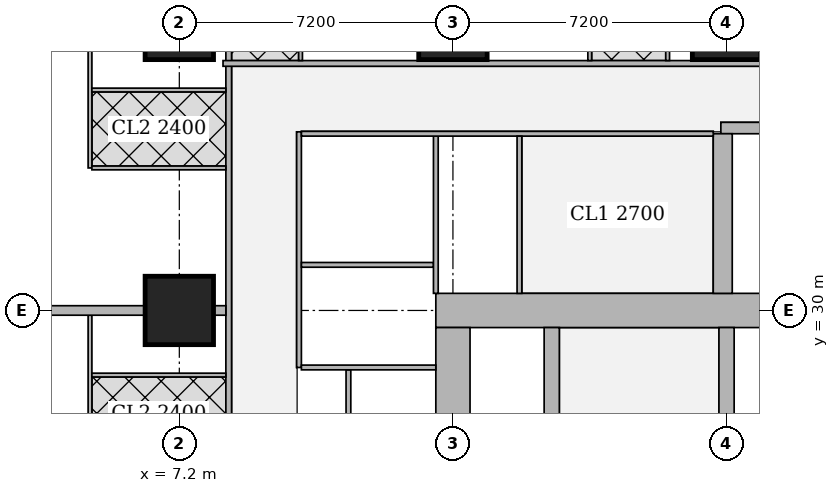
"""IFC4 building model, lengths in metres.
Left out: names, types, materials, properties, quantities, classifications, styles, units other than length and angle.
Written with IfcOpenShell. Run it as: python <this file> out.ifc"""

import sys

from ifc_helpers import new_model, si_unit, direction, frame, frame_2d, origin, origin_2d, place, context, subcontext, project, spatial, rectangle, extrude, element, fill, save


model = new_model("IFC4")
c1 = context("Model", 3, precision=1e-05, world=origin(), true_north=direction((0.0, 1.0)))
c2 = subcontext(c1, "Body", "Model", "MODEL_VIEW")
j1 = project(units=[si_unit("LENGTHUNIT", "METRE"), si_unit("PLANEANGLEUNIT", "RADIAN")], contexts=[c1])
p1 = place(None, origin())
s1 = spatial("IfcSite", under=j1, at=p1, CompositionType="ELEMENT")
p2 = place(p1, origin())
s2 = spatial("IfcBuilding", under=s1, at=p2, CompositionType="ELEMENT")
p3 = place(p2, frame((0.0, 0.0, 42.5)))
s3 = spatial("IfcBuildingStorey", under=s2, at=p3, CompositionType="ELEMENT", Elevation=42.5)
for number, where, z_axis, x_axis in (
    (1, (7.2, 30.0, 0.0), (0.0, 0.0, 1.0), (1.0, 0.0, 0.0)),
    (2, (7.2, 37.5, 0.0), (0.0, 0.0, 1.0), (1.0, 0.0, 0.0)),
    (3, (14.4, 37.5, 0.0), (0.0, 0.0, 1.0), (1.0, 0.0, 0.0)),
    (4, (21.6, 37.5, 0.0), (0.0, 0.0, 1.0), (1.0, 0.0, 0.0)),
):
    element("IfcColumn", number, at=place(p3, frame(where, z_axis=z_axis, x_axis=x_axis)), inside=s3, PredefinedType="COLUMN", context=c2, shape_type="SweptSolid", body=[
        extrude(rectangle(XDim=1.8, YDim=1.8, at=origin_2d()), origin(), (0.0, 0.0, 1.0), 3.75),
    ])
p4 = place(p3, frame((13.95, 30.0, 0.0), z_axis=(0.0, 0.0, 1.0), x_axis=(1.0, 0.0, 0.0)))
e5 = element("IfcWall", 5, at=p4, inside=s3, PredefinedType="SHEAR", context=c2, shape_type="SweptSolid", body=[
    extrude(rectangle(XDim=15.3, YDim=0.9, at=frame_2d((7.65, 0.0))), origin(), (0.0, 0.0, 1.0), 3.75),
])
p5 = place(p4, frame((4.45, 0.0, 0.0)))
e6 = element("IfcOpeningElement", 6, at=p5, cuts=e5, PredefinedType="OPENING", context=c2, shape_type="SweptSolid", body=[
    extrude(rectangle(XDim=1.8, YDim=2.1, at=frame_2d((0.9, 1.05))), frame((0.0, 0.46, 0.0), z_axis=(0.0, -1.0, 0.0), x_axis=(1.0, 0.0, 0.0)), (0.0, 0.0, 1.0), 0.92),
])
p6 = place(p4, frame((10.7, 0.0, 0.0)))
e7 = element("IfcOpeningElement", 7, at=p6, cuts=e5, PredefinedType="OPENING", context=c2, shape_type="SweptSolid", body=[
    extrude(rectangle(XDim=1.1, YDim=2.1, at=frame_2d((0.55, 1.05))), frame((0.0, 0.46, 0.0), z_axis=(0.0, -1.0, 0.0), x_axis=(1.0, 0.0, 0.0)), (0.0, 0.0, 1.0), 0.92),
])
p7 = place(p3, frame((14.4, 15.45, 0.0), z_axis=(0.0, 0.0, 1.0), x_axis=(0.0, 1.0, 0.0)))
e8 = element("IfcWall", 8, at=p7, inside=s3, PredefinedType="SHEAR", context=c2, shape_type="SweptSolid", body=[
    extrude(rectangle(XDim=14.1, YDim=0.9, at=frame_2d((7.05, 0.0))), origin(), (0.0, 0.0, 1.0), 3.75),
])
p8 = place(p3, frame((17.0, 15.45, 0.0), z_axis=(0.0, 0.0, 1.0), x_axis=(0.0, 1.0, 0.0)))
e9 = element("IfcWall", 9, at=p8, inside=s3, PredefinedType="SHEAR", context=c2, shape_type="SweptSolid", body=[
    extrude(rectangle(XDim=14.1, YDim=0.4, at=frame_2d((7.05, 0.0))), origin(), (0.0, 0.0, 1.0), 3.75),
])
p9 = place(p8, frame((0.875, 0.0, 0.0)))
e10 = element("IfcOpeningElement", 10, at=p9, cuts=e9, PredefinedType="OPENING", context=c2, shape_type="SweptSolid", body=[
    extrude(rectangle(XDim=1.1, YDim=2.1, at=frame_2d((0.55, 1.05))), frame((0.0, 0.21, 0.0), z_axis=(0.0, -1.0, 0.0), x_axis=(1.0, 0.0, 0.0)), (0.0, 0.0, 1.0), 0.42),
])
p10 = place(p8, frame((4.625, 0.0, 0.0)))
e11 = element("IfcOpeningElement", 11, at=p10, cuts=e9, PredefinedType="OPENING", context=c2, shape_type="SweptSolid", body=[
    extrude(rectangle(XDim=1.1, YDim=2.1, at=frame_2d((0.55, 1.05))), frame((0.0, 0.21, 0.0), z_axis=(0.0, -1.0, 0.0), x_axis=(1.0, 0.0, 0.0)), (0.0, 0.0, 1.0), 0.42),
])
p11 = place(p8, frame((8.375, 0.0, 0.0)))
e12 = element("IfcOpeningElement", 12, at=p11, cuts=e9, PredefinedType="OPENING", context=c2, shape_type="SweptSolid", body=[
    extrude(rectangle(XDim=1.1, YDim=2.1, at=frame_2d((0.55, 1.05))), frame((0.0, 0.21, 0.0), z_axis=(0.0, -1.0, 0.0), x_axis=(1.0, 0.0, 0.0)), (0.0, 0.0, 1.0), 0.42),
])
p12 = place(p8, frame((12.125, 0.0, 0.0)))
e13 = element("IfcOpeningElement", 13, at=p12, cuts=e9, PredefinedType="OPENING", context=c2, shape_type="SweptSolid", body=[
    extrude(rectangle(XDim=1.1, YDim=2.1, at=frame_2d((0.55, 1.05))), frame((0.0, 0.21, 0.0), z_axis=(0.0, -1.0, 0.0), x_axis=(1.0, 0.0, 0.0)), (0.0, 0.0, 1.0), 0.42),
])
p13 = place(p3, frame((21.6, 15.45, 0.0), z_axis=(0.0, 0.0, 1.0), x_axis=(0.0, 1.0, 0.0)))
e14 = element("IfcWall", 14, at=p13, inside=s3, PredefinedType="SHEAR", context=c2, shape_type="SweptSolid", body=[
    extrude(rectangle(XDim=14.1, YDim=0.4, at=frame_2d((7.05, 0.0))), origin(), (0.0, 0.0, 1.0), 3.75),
])
p14 = place(p3, frame((21.45, 34.8, 0.0), z_axis=(0.0, 0.0, 1.0), x_axis=(1.0, 0.0, 0.0)))
e15 = element("IfcWall", 15, at=p14, inside=s3, PredefinedType="SHEAR", context=c2, shape_type="SweptSolid", body=[
    extrude(rectangle(XDim=7.5, YDim=0.3, at=frame_2d((3.75, 0.0))), origin(), (0.0, 0.0, 1.0), 3.75),
])
p15 = place(p14, frame((0.5, 0.0, 0.0)))
e16 = element("IfcOpeningElement", 16, at=p15, cuts=e15, PredefinedType="OPENING", context=c2, shape_type="SweptSolid", body=[
    extrude(rectangle(XDim=1.1, YDim=2.1, at=frame_2d((0.55, 1.05))), frame((0.0, 0.16, 0.0), z_axis=(0.0, -1.0, 0.0), x_axis=(1.0, 0.0, 0.0)), (0.0, 0.0, 1.0), 0.32),
])
p16 = place(p3, frame((21.5, 30.45, 0.0), z_axis=(0.0, 0.0, 1.0), x_axis=(0.0, 1.0, 0.0)))
e17 = element("IfcWall", 17, at=p16, inside=s3, PredefinedType="SHEAR", context=c2, shape_type="SweptSolid", body=[
    extrude(rectangle(XDim=4.2, YDim=0.5, at=frame_2d((2.1, 0.0))), origin(), (0.0, 0.0, 1.0), 3.75),
])
p17 = place(p3, frame((8.5, 2.426, 0.0), z_axis=(0.0, 0.0, 1.0), x_axis=(0.0, 1.0, 0.0)))
e18 = element("IfcWall", 18, at=p17, inside=s3, PredefinedType="SOLIDWALL", context=c2, shape_type="SweptSolid", body=[
    extrude(rectangle(XDim=40.173, YDim=0.15, at=frame_2d((20.086, 0.0))), origin(), (0.0, 0.0, 1.0), 3.5),
])
p18 = place(p17, frame((9.986, 0.0, 0.0)))
e19 = element("IfcOpeningElement", 19, at=p18, cuts=e18, PredefinedType="OPENING", context=c2, shape_type="SweptSolid", body=[
    extrude(rectangle(XDim=1.0, YDim=2.1, at=frame_2d((0.5, 1.05))), frame((0.0, 0.085, 0.0), z_axis=(0.0, -1.0, 0.0), x_axis=(1.0, 0.0, 0.0)), (0.0, 0.0, 1.0), 0.17),
])
p19 = place(p17, frame((14.161, 0.0, 0.0)))
e20 = element("IfcOpeningElement", 20, at=p19, cuts=e18, PredefinedType="OPENING", context=c2, shape_type="SweptSolid", body=[
    extrude(rectangle(XDim=1.0, YDim=2.1, at=frame_2d((0.5, 1.05))), frame((0.0, 0.085, 0.0), z_axis=(0.0, -1.0, 0.0), x_axis=(1.0, 0.0, 0.0)), (0.0, 0.0, 1.0), 0.17),
])
p20 = place(p17, frame((21.662, 0.0, 0.0)))
e21 = element("IfcOpeningElement", 21, at=p20, cuts=e18, PredefinedType="OPENING", context=c2, shape_type="SweptSolid", body=[
    extrude(rectangle(XDim=1.0, YDim=2.1, at=frame_2d((0.5, 1.05))), frame((0.0, 0.085, 0.0), z_axis=(0.0, -1.0, 0.0), x_axis=(1.0, 0.0, 0.0)), (0.0, 0.0, 1.0), 0.17),
])
p21 = place(p17, frame((29.161, 0.0, 0.0)))
e22 = element("IfcOpeningElement", 22, at=p21, cuts=e18, PredefinedType="OPENING", context=c2, shape_type="SweptSolid", body=[
    extrude(rectangle(XDim=1.0, YDim=2.1, at=frame_2d((0.5, 1.05))), frame((0.0, 0.085, 0.0), z_axis=(0.0, -1.0, 0.0), x_axis=(1.0, 0.0, 0.0)), (0.0, 0.0, 1.0), 0.17),
])
p22 = place(p3, frame((8.35, 36.5, 0.0), z_axis=(0.0, 0.0, 1.0), x_axis=(1.0, 0.0, 0.0)))
e23 = element("IfcWall", 23, at=p22, inside=s3, PredefinedType="SOLIDWALL", context=c2, shape_type="SweptSolid", body=[
    extrude(rectangle(XDim=26.415, YDim=0.15, at=frame_2d((13.208, 0.0))), origin(), (0.0, 0.0, 1.0), 3.5),
])
p23 = place(p22, frame((3.383, 0.0, 0.0)))
e24 = element("IfcOpeningElement", 24, at=p23, cuts=e23, PredefinedType="OPENING", context=c2, shape_type="SweptSolid", body=[
    extrude(rectangle(XDim=1.0, YDim=2.1, at=frame_2d((0.5, 1.05))), frame((0.0, 0.085, 0.0), z_axis=(0.0, -1.0, 0.0), x_axis=(1.0, 0.0, 0.0)), (0.0, 0.0, 1.0), 0.17),
])
p24 = place(p22, frame((7.65, 0.0, 0.0)))
e25 = element("IfcOpeningElement", 25, at=p24, cuts=e23, PredefinedType="OPENING", context=c2, shape_type="SweptSolid", body=[
    extrude(rectangle(XDim=1.0, YDim=2.1, at=frame_2d((0.5, 1.05))), frame((0.0, 0.085, 0.0), z_axis=(0.0, -1.0, 0.0), x_axis=(1.0, 0.0, 0.0)), (0.0, 0.0, 1.0), 0.17),
])
p25 = place(p22, frame((14.85, 0.0, 0.0)))
e26 = element("IfcOpeningElement", 26, at=p25, cuts=e23, PredefinedType="OPENING", context=c2, shape_type="SweptSolid", body=[
    extrude(rectangle(XDim=1.0, YDim=2.1, at=frame_2d((0.5, 1.05))), frame((0.0, 0.085, 0.0), z_axis=(0.0, -1.0, 0.0), x_axis=(1.0, 0.0, 0.0)), (0.0, 0.0, 1.0), 0.17),
])
p26 = place(p22, frame((23.923, 0.0, 0.0)))
e27 = element("IfcOpeningElement", 27, at=p26, cuts=e23, PredefinedType="OPENING", context=c2, shape_type="SweptSolid", body=[
    extrude(rectangle(XDim=1.0, YDim=2.1, at=frame_2d((0.5, 1.05))), frame((0.0, 0.085, 0.0), z_axis=(0.0, -1.0, 0.0), x_axis=(1.0, 0.0, 0.0)), (0.0, 0.0, 1.0), 0.17),
])
p27 = place(p3, frame((4.85, 26.25, 0.0), z_axis=(0.0, 0.0, 1.0), x_axis=(0.0, 1.0, 0.0)))
e28 = element("IfcWall", 28, at=p27, inside=s3, PredefinedType="PARTITIONING", context=c2, shape_type="SweptSolid", body=[
    extrude(rectangle(XDim=3.625, YDim=0.1, at=frame_2d((1.812, 0.0))), origin(), (0.0, 0.0, 1.0), 3.5),
])
p28 = place(p27, frame((0.575, 0.0, 0.0)))
e29 = element("IfcOpeningElement", 29, at=p28, cuts=e28, PredefinedType="OPENING", context=c2, shape_type="SweptSolid", body=[
    extrude(rectangle(XDim=0.9, YDim=2.1, at=frame_2d((0.45, 1.05))), frame((0.0, 0.06, 0.0), z_axis=(0.0, -1.0, 0.0), x_axis=(1.0, 0.0, 0.0)), (0.0, 0.0, 1.0), 0.12),
])
p29 = place(p27, frame((2.45, 0.0, 0.0)))
e30 = element("IfcOpeningElement", 30, at=p29, cuts=e28, PredefinedType="OPENING", context=c2, shape_type="SweptSolid", body=[
    extrude(rectangle(XDim=0.9, YDim=2.1, at=frame_2d((0.45, 1.05))), frame((0.0, 0.06, 0.0), z_axis=(0.0, -1.0, 0.0), x_axis=(1.0, 0.0, 0.0)), (0.0, 0.0, 1.0), 0.12),
])
p30 = place(p3, frame((4.9, 28.3, 0.0), z_axis=(0.0, 0.0, 1.0), x_axis=(1.0, 0.0, 0.0)))
e31 = element("IfcWall", 31, at=p30, inside=s3, PredefinedType="PARTITIONING", context=c2, shape_type="SweptSolid", body=[
    extrude(rectangle(XDim=3.525, YDim=0.1, at=frame_2d((1.763, 0.0))), origin(), (0.0, 0.0, 1.0), 3.5),
])
p31 = place(p3, frame((4.85, 33.75, 0.0), z_axis=(0.0, 0.0, 1.0), x_axis=(0.0, 1.0, 0.0)))
e32 = element("IfcWall", 32, at=p31, inside=s3, PredefinedType="PARTITIONING", context=c2, shape_type="SweptSolid", body=[
    extrude(rectangle(XDim=8.244, YDim=0.1, at=frame_2d((4.122, 0.0))), origin(), (0.0, 0.0, 1.0), 3.5),
])
p32 = place(p31, frame((0.575, 0.0, 0.0)))
e33 = element("IfcOpeningElement", 33, at=p32, cuts=e32, PredefinedType="OPENING", context=c2, shape_type="SweptSolid", body=[
    extrude(rectangle(XDim=0.9, YDim=2.1, at=frame_2d((0.45, 1.05))), frame((0.0, 0.06, 0.0), z_axis=(0.0, -1.0, 0.0), x_axis=(1.0, 0.0, 0.0)), (0.0, 0.0, 1.0), 0.12),
])
p33 = place(p31, frame((4.1, 0.0, 0.0)))
e34 = element("IfcOpeningElement", 34, at=p33, cuts=e32, PredefinedType="OPENING", context=c2, shape_type="SweptSolid", body=[
    extrude(rectangle(XDim=0.9, YDim=2.1, at=frame_2d((0.45, 1.05))), frame((0.0, 0.06, 0.0), z_axis=(0.0, -1.0, 0.0), x_axis=(1.0, 0.0, 0.0)), (0.0, 0.0, 1.0), 0.12),
])
p34 = place(p31, frame((2.45, 0.0, 0.0)))
e35 = element("IfcOpeningElement", 35, at=p34, cuts=e32, PredefinedType="OPENING", context=c2, shape_type="SweptSolid", body=[
    extrude(rectangle(XDim=0.9, YDim=2.1, at=frame_2d((0.45, 1.05))), frame((0.0, 0.06, 0.0), z_axis=(0.0, -1.0, 0.0), x_axis=(1.0, 0.0, 0.0)), (0.0, 0.0, 1.0), 0.12),
])
p35 = place(p31, frame((5.975, 0.0, 0.0)))
e36 = element("IfcOpeningElement", 36, at=p35, cuts=e32, PredefinedType="OPENING", context=c2, shape_type="SweptSolid", body=[
    extrude(rectangle(XDim=0.9, YDim=2.1, at=frame_2d((0.45, 1.05))), frame((0.0, 0.06, 0.0), z_axis=(0.0, -1.0, 0.0), x_axis=(1.0, 0.0, 0.0)), (0.0, 0.0, 1.0), 0.12),
])
for number, where, z_axis, x_axis in (
    (37, (4.9, 33.75, 0.0), (0.0, 0.0, 1.0), (1.0, 0.0, 0.0)),
    (38, (4.9, 35.8, 0.0), (0.0, 0.0, 1.0), (1.0, 0.0, 0.0)),
):
    element("IfcWall", number, at=place(p3, frame(where, z_axis=z_axis, x_axis=x_axis)), inside=s3, PredefinedType="PARTITIONING", context=c2, shape_type="SweptSolid", body=[
        extrude(rectangle(XDim=3.525, YDim=0.1, at=frame_2d((1.763, 0.0))), origin(), (0.0, 0.0, 1.0), 3.5),
    ])
p36 = place(p3, frame((3.65, 30.0, 0.0), z_axis=(0.0, 0.0, 1.0), x_axis=(1.0, 0.0, 0.0)))
e39 = element("IfcWall", 39, at=p36, inside=s3, PredefinedType="SOLIDWALL", context=c2, shape_type="SweptSolid", body=[
    extrude(rectangle(XDim=2.649, YDim=0.25, at=frame_2d((1.325, 0.0))), origin(), (0.0, 0.0, 1.0), 3.5),
])
p37 = place(p3, frame((8.101, 30.0, 0.0), z_axis=(0.0, 0.0, 1.0), x_axis=(1.0, 0.0, 0.0)))
e40 = element("IfcWall", 40, at=p37, inside=s3, PredefinedType="SOLIDWALL", context=c2, shape_type="SweptSolid", body=[
    extrude(rectangle(XDim=0.324, YDim=0.25, at=frame_2d((0.162, 0.0))), origin(), (0.0, 0.0, 1.0), 3.5),
])
for number, where, z_axis, x_axis in (
    (41, (10.39, 36.575, 0.0), (0.0, 0.0, 1.0), (0.0, 1.0, 0.0)),
    (42, (18.0, 36.575, 0.0), (0.0, 0.0, 1.0), (0.0, 1.0, 0.0)),
    (43, (20.05, 36.575, 0.0), (0.0, 0.0, 1.0), (0.0, 1.0, 0.0)),
):
    element("IfcWall", number, at=place(p3, frame(where, z_axis=z_axis, x_axis=x_axis)), inside=s3, PredefinedType="PARTITIONING", context=c2, shape_type="SweptSolid", body=[
        extrude(rectangle(XDim=3.525, YDim=0.1, at=frame_2d((1.763, 0.0))), origin(), (0.0, 0.0, 1.0), 3.5),
    ])
p38 = place(p3, frame((10.35, 28.5, 0.0), z_axis=(0.0, 0.0, 1.0), x_axis=(0.0, 1.0, 0.0)))
e44 = element("IfcWall", 44, at=p38, inside=s3, PredefinedType="PARTITIONING", context=c2, shape_type="SweptSolid", body=[
    extrude(rectangle(XDim=6.2, YDim=0.125, at=frame_2d((3.1, 0.0))), origin(), (0.0, 0.0, 1.0), 3.5),
])
p39 = place(p38, frame((0.85, 0.0, 0.0)))
e45 = element("IfcOpeningElement", 45, at=p39, cuts=e44, PredefinedType="OPENING", context=c2, shape_type="SweptSolid", body=[
    extrude(rectangle(XDim=1.0, YDim=2.1, at=frame_2d((0.5, 1.05))), frame((0.0, 0.073, 0.0), z_axis=(0.0, -1.0, 0.0), x_axis=(1.0, 0.0, 0.0)), (0.0, 0.0, 1.0), 0.145),
])
p40 = place(p38, frame((3.95, 0.0, 0.0)))
e46 = element("IfcOpeningElement", 46, at=p40, cuts=e44, PredefinedType="OPENING", context=c2, shape_type="SweptSolid", body=[
    extrude(rectangle(XDim=1.0, YDim=2.1, at=frame_2d((0.5, 1.05))), frame((0.0, 0.073, 0.0), z_axis=(0.0, -1.0, 0.0), x_axis=(1.0, 0.0, 0.0)), (0.0, 0.0, 1.0), 0.145),
])
p41 = place(p3, frame((11.65, 19.562, 0.0), z_axis=(0.0, 0.0, 1.0), x_axis=(0.0, 1.0, 0.0)))
e47 = element("IfcWall", 47, at=p41, inside=s3, PredefinedType="PARTITIONING", context=c2, shape_type="SweptSolid", body=[
    extrude(rectangle(XDim=8.876, YDim=0.125, at=frame_2d((4.438, 0.0))), origin(), (0.0, 0.0, 1.0), 3.5),
])
p42 = place(p41, frame((3.938, 0.0, 0.0)))
e48 = element("IfcOpeningElement", 48, at=p42, cuts=e47, PredefinedType="OPENING", context=c2, shape_type="SweptSolid", body=[
    extrude(rectangle(XDim=1.0, YDim=2.1, at=frame_2d((0.5, 1.05))), frame((0.0, 0.073, 0.0), z_axis=(0.0, -1.0, 0.0), x_axis=(1.0, 0.0, 0.0)), (0.0, 0.0, 1.0), 0.145),
])
p43 = place(p3, frame((10.413, 28.5, 0.0), z_axis=(0.0, 0.0, 1.0), x_axis=(1.0, 0.0, 0.0)))
e49 = element("IfcWall", 49, at=p43, inside=s3, PredefinedType="PARTITIONING", context=c2, shape_type="SweptSolid", body=[
    extrude(rectangle(XDim=3.537, YDim=0.125, at=frame_2d((1.769, 0.0))), origin(), (0.0, 0.0, 1.0), 3.5),
])
p44 = place(p3, frame((10.413, 31.2, 0.0), z_axis=(0.0, 0.0, 1.0), x_axis=(1.0, 0.0, 0.0)))
e50 = element("IfcWall", 50, at=p44, inside=s3, PredefinedType="PARTITIONING", context=c2, shape_type="SweptSolid", body=[
    extrude(rectangle(XDim=3.475, YDim=0.125, at=frame_2d((1.737, 0.0))), origin(), (0.0, 0.0, 1.0), 3.5),
])
p45 = place(p3, frame((13.95, 30.45, 0.0), z_axis=(0.0, 0.0, 1.0), x_axis=(0.0, 1.0, 0.0)))
e51 = element("IfcWall", 51, at=p45, inside=s3, PredefinedType="PARTITIONING", context=c2, shape_type="SweptSolid", body=[
    extrude(rectangle(XDim=4.137, YDim=0.125, at=frame_2d((2.068, 0.0))), origin(), (0.0, 0.0, 1.0), 3.5),
])
p46 = place(p3, frame((10.413, 34.65, 0.0), z_axis=(0.0, 0.0, 1.0), x_axis=(1.0, 0.0, 0.0)))
e52 = element("IfcWall", 52, at=p46, inside=s3, PredefinedType="PARTITIONING", context=c2, shape_type="SweptSolid", body=[
    extrude(rectangle(XDim=10.837, YDim=0.125, at=frame_2d((5.418, 0.0))), origin(), (0.0, 0.0, 1.0), 3.5),
])
p47 = place(p46, frame((7.487, 0.0, 0.0)))
e53 = element("IfcOpeningElement", 53, at=p47, cuts=e52, PredefinedType="OPENING", context=c2, shape_type="SweptSolid", body=[
    extrude(rectangle(XDim=1.8, YDim=2.1, at=frame_2d((0.9, 1.05))), frame((0.0, 0.073, 0.0), z_axis=(0.0, -1.0, 0.0), x_axis=(1.0, 0.0, 0.0)), (0.0, 0.0, 1.0), 0.145),
])
p48 = place(p3, frame((16.15, 30.45, 0.0), z_axis=(0.0, 0.0, 1.0), x_axis=(0.0, 1.0, 0.0)))
e54 = element("IfcWall", 54, at=p48, inside=s3, PredefinedType="PARTITIONING", context=c2, shape_type="SweptSolid", body=[
    extrude(rectangle(XDim=4.137, YDim=0.125, at=frame_2d((2.068, 0.0))), origin(), (0.0, 0.0, 1.0), 3.5),
])
p49 = place(p48, frame((1.625, 0.0, 0.0)))
e55 = element("IfcOpeningElement", 55, at=p49, cuts=e54, PredefinedType="OPENING", context=c2, shape_type="SweptSolid", body=[
    extrude(rectangle(XDim=1.0, YDim=2.1, at=frame_2d((0.5, 1.05))), frame((0.0, 0.073, 0.0), z_axis=(0.0, -1.0, 0.0), x_axis=(1.0, 0.0, 0.0)), (0.0, 0.0, 1.0), 0.145),
])
p50 = place(p28, origin())
e56 = element("IfcDoor", 56, at=p50, inside=s3, OperationType="SINGLE_SWING_RIGHT", PredefinedType="DOOR", context=c2, shape_type="SweptSolid", body=[
    extrude(rectangle(XDim=0.9, YDim=2.1, at=frame_2d((0.45, 1.05))), frame((0.0, 0.025, 0.0), z_axis=(0.0, -1.0, 0.0), x_axis=(1.0, 0.0, 0.0)), (0.0, 0.0, 1.0), 0.05),
])
fill(e29, e56)
p51 = place(p29, origin())
e57 = element("IfcDoor", 57, at=p51, inside=s3, OperationType="SINGLE_SWING_LEFT", PredefinedType="DOOR", context=c2, shape_type="SweptSolid", body=[
    extrude(rectangle(XDim=0.9, YDim=2.1, at=frame_2d((0.45, 1.05))), frame((0.0, 0.025, 0.0), z_axis=(0.0, -1.0, 0.0), x_axis=(1.0, 0.0, 0.0)), (0.0, 0.0, 1.0), 0.05),
])
fill(e30, e57)
p52 = place(p32, origin())
e58 = element("IfcDoor", 58, at=p52, inside=s3, OperationType="SINGLE_SWING_RIGHT", PredefinedType="DOOR", context=c2, shape_type="SweptSolid", body=[
    extrude(rectangle(XDim=0.9, YDim=2.1, at=frame_2d((0.45, 1.05))), frame((0.0, 0.025, 0.0), z_axis=(0.0, -1.0, 0.0), x_axis=(1.0, 0.0, 0.0)), (0.0, 0.0, 1.0), 0.05),
])
fill(e33, e58)
p53 = place(p34, origin())
e59 = element("IfcDoor", 59, at=p53, inside=s3, OperationType="SINGLE_SWING_LEFT", PredefinedType="DOOR", context=c2, shape_type="SweptSolid", body=[
    extrude(rectangle(XDim=0.9, YDim=2.1, at=frame_2d((0.45, 1.05))), frame((0.0, 0.025, 0.0), z_axis=(0.0, -1.0, 0.0), x_axis=(1.0, 0.0, 0.0)), (0.0, 0.0, 1.0), 0.05),
])
fill(e35, e59)
p54 = place(p21, origin())
e60 = element("IfcDoor", 60, at=p54, inside=s3, OperationType="SINGLE_SWING_RIGHT", PredefinedType="DOOR", context=c2, shape_type="SweptSolid", body=[
    extrude(rectangle(XDim=1.0, YDim=2.1, at=frame_2d((0.5, 1.05))), frame((0.0, 0.025, 0.0), z_axis=(0.0, -1.0, 0.0), x_axis=(1.0, 0.0, 0.0)), (0.0, 0.0, 1.0), 0.05),
])
fill(e22, e60)
p55 = place(p23, origin())
e61 = element("IfcDoor", 61, at=p55, inside=s3, OperationType="SINGLE_SWING_RIGHT", PredefinedType="DOOR", context=c2, shape_type="SweptSolid", body=[
    extrude(rectangle(XDim=1.0, YDim=2.1, at=frame_2d((0.5, 1.05))), frame((0.0, 0.025, 0.0), z_axis=(0.0, -1.0, 0.0), x_axis=(1.0, 0.0, 0.0)), (0.0, 0.0, 1.0), 0.05),
])
fill(e24, e61)
p56 = place(p24, origin())
e62 = element("IfcDoor", 62, at=p56, inside=s3, OperationType="SINGLE_SWING_RIGHT", PredefinedType="DOOR", context=c2, shape_type="SweptSolid", body=[
    extrude(rectangle(XDim=1.0, YDim=2.1, at=frame_2d((0.5, 1.05))), frame((0.0, 0.025, 0.0), z_axis=(0.0, -1.0, 0.0), x_axis=(1.0, 0.0, 0.0)), (0.0, 0.0, 1.0), 0.05),
])
fill(e25, e62)
p57 = place(p39, origin())
e63 = element("IfcDoor", 63, at=p57, inside=s3, OperationType="SINGLE_SWING_RIGHT", PredefinedType="DOOR", context=c2, shape_type="SweptSolid", body=[
    extrude(rectangle(XDim=1.0, YDim=2.1, at=frame_2d((0.5, 1.05))), frame((0.0, 0.025, 0.0), z_axis=(0.0, -1.0, 0.0), x_axis=(1.0, 0.0, 0.0)), (0.0, 0.0, 1.0), 0.05),
])
fill(e45, e63)
p58 = place(p40, origin())
e64 = element("IfcDoor", 64, at=p58, inside=s3, OperationType="SINGLE_SWING_LEFT", PredefinedType="DOOR", context=c2, shape_type="SweptSolid", body=[
    extrude(rectangle(XDim=1.0, YDim=2.1, at=frame_2d((0.5, 1.05))), frame((0.0, 0.025, 0.0), z_axis=(0.0, -1.0, 0.0), x_axis=(1.0, 0.0, 0.0)), (0.0, 0.0, 1.0), 0.05),
])
fill(e46, e64)
p59 = place(p49, origin())
e65 = element("IfcDoor", 65, at=p59, inside=s3, OperationType="SINGLE_SWING_RIGHT", PredefinedType="DOOR", context=c2, shape_type="SweptSolid", body=[
    extrude(rectangle(XDim=1.0, YDim=2.1, at=frame_2d((0.5, 1.05))), frame((0.0, 0.025, 0.0), z_axis=(0.0, -1.0, 0.0), x_axis=(1.0, 0.0, 0.0)), (0.0, 0.0, 1.0), 0.05),
])
fill(e55, e65)
p60 = place(p47, origin())
e66 = element("IfcDoor", 66, at=p60, inside=s3, OperationType="DOUBLE_DOOR_SINGLE_SWING", PredefinedType="DOOR", context=c2, shape_type="SweptSolid", body=[
    extrude(rectangle(XDim=1.8, YDim=2.1, at=frame_2d((0.9, 1.05))), frame((0.0, 0.025, 0.0), z_axis=(0.0, -1.0, 0.0), x_axis=(1.0, 0.0, 0.0)), (0.0, 0.0, 1.0), 0.05),
])
fill(e53, e66)
p61 = place(p5, origin())
e67 = element("IfcDoor", 67, at=p61, inside=s3, OperationType="DOUBLE_DOOR_SINGLE_SWING", PredefinedType="DOOR", context=c2, shape_type="SweptSolid", body=[
    extrude(rectangle(XDim=1.8, YDim=2.1, at=frame_2d((0.9, 1.05))), frame((0.0, 0.025, 0.0), z_axis=(0.0, -1.0, 0.0), x_axis=(1.0, 0.0, 0.0)), (0.0, 0.0, 1.0), 0.05),
])
fill(e6, e67)
p62 = place(p12, origin())
e68 = element("IfcDoor", 68, at=p62, inside=s3, OperationType="DOUBLE_DOOR_SLIDING", PredefinedType="DOOR", context=c2, shape_type="SweptSolid", body=[
    extrude(rectangle(XDim=1.1, YDim=2.1, at=frame_2d((0.55, 1.05))), frame((0.0, 0.025, 0.0), z_axis=(0.0, -1.0, 0.0), x_axis=(1.0, 0.0, 0.0)), (0.0, 0.0, 1.0), 0.05),
])
fill(e13, e68)
p63 = place(p15, origin())
e69 = element("IfcDoor", 69, at=p63, inside=s3, OperationType="SINGLE_SWING_RIGHT", PredefinedType="DOOR", context=c2, shape_type="SweptSolid", body=[
    extrude(rectangle(XDim=1.1, YDim=2.1, at=frame_2d((0.55, 1.05))), frame((0.0, 0.025, 0.0), z_axis=(0.0, -1.0, 0.0), x_axis=(1.0, 0.0, 0.0)), (0.0, 0.0, 1.0), 0.05),
])
fill(e16, e69)
save(model, sys.argv[1])
